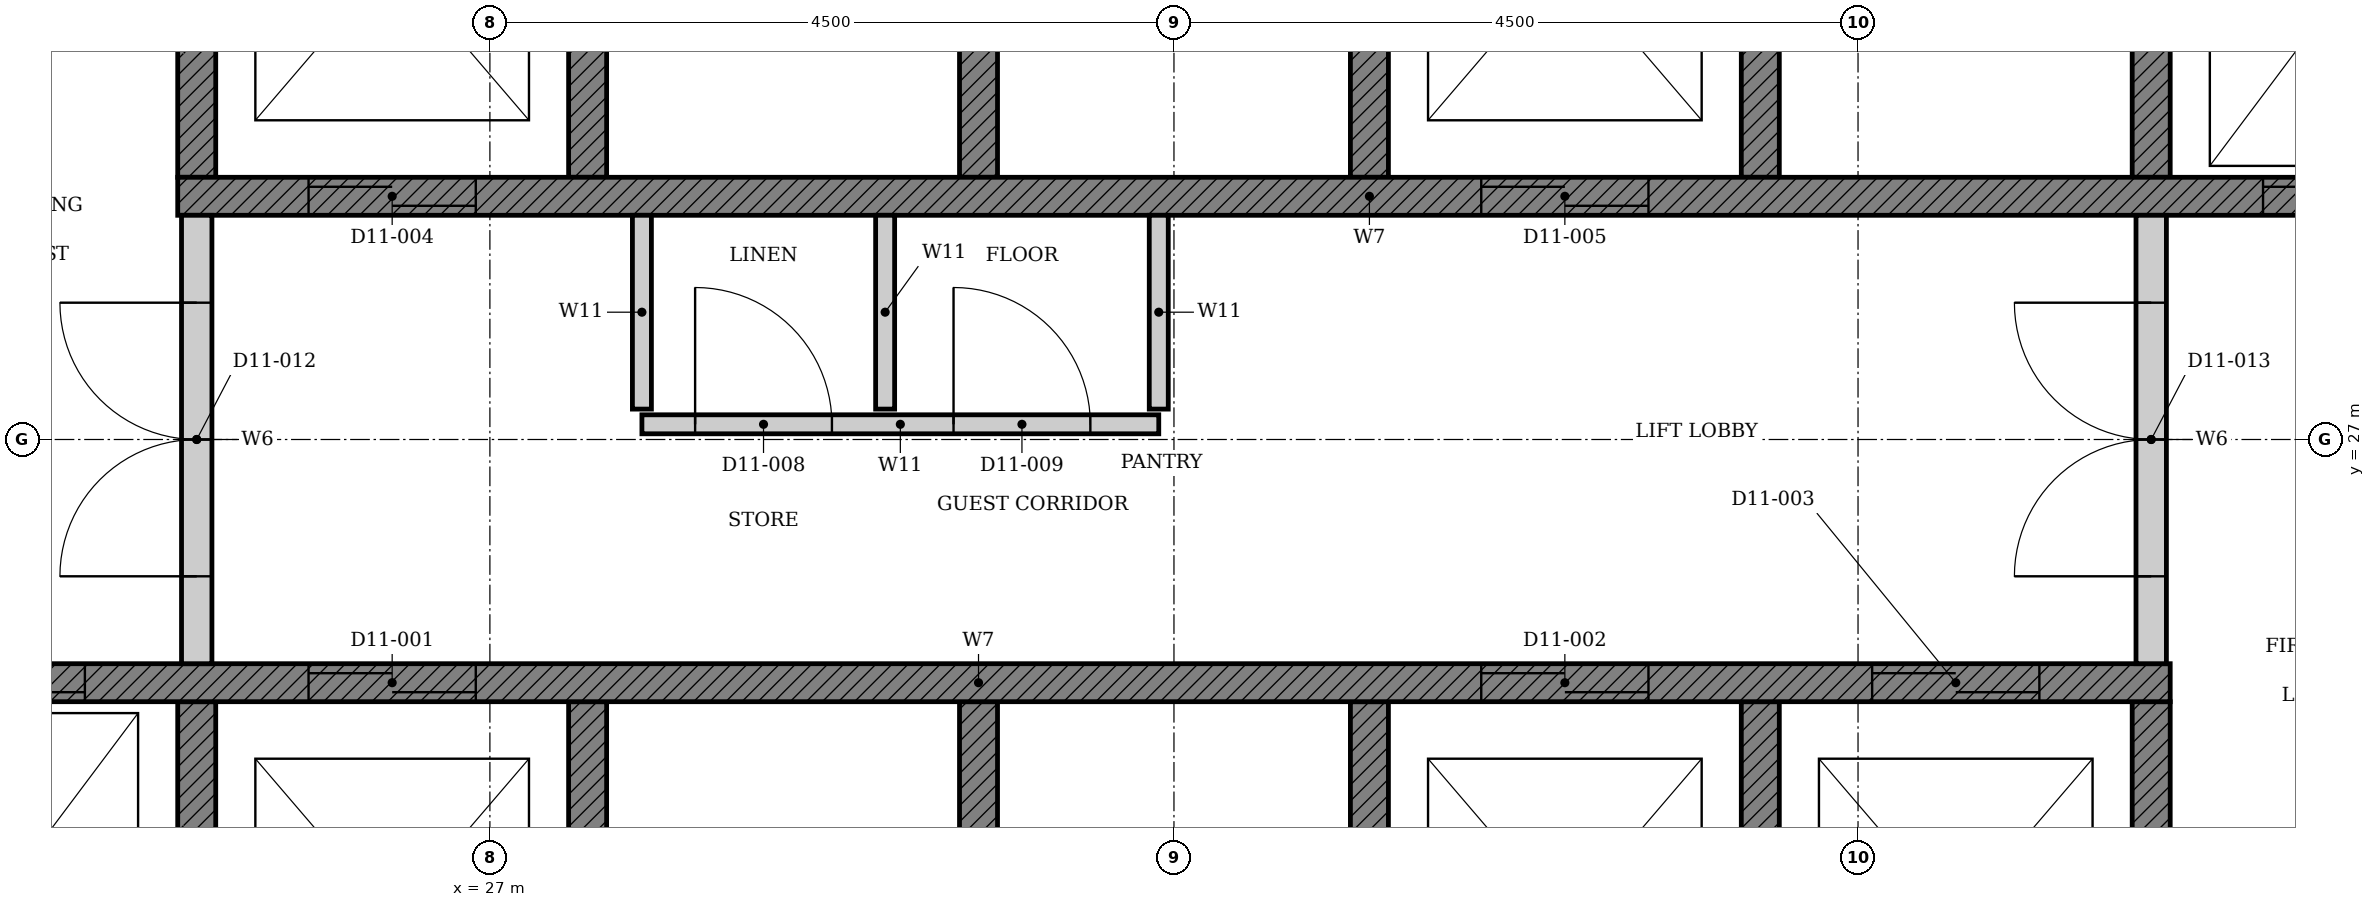
"""IFC4 building model, lengths in metres.
Left out: names, types, materials, properties, quantities, classifications, styles, units other than length and angle.
Written with IfcOpenShell. Run it as: python <this file> out.ifc"""

import sys

from ifc_helpers import new_model, si_unit, direction, frame, frame_2d, origin, place, context, subcontext, project, spatial, polyline, rectangle, outline, extrude, element, fill, save


model = new_model("IFC4")
c1 = context("Model", 3, precision=1e-05, world=origin(), true_north=direction((0.0, 1.0)))
c2 = subcontext(c1, "Body", "Model", "MODEL_VIEW")
j1 = project(units=[si_unit("LENGTHUNIT", "METRE"), si_unit("PLANEANGLEUNIT", "RADIAN")], contexts=[c1])
p1 = place(None, origin())
s1 = spatial("IfcSite", under=j1, at=p1, CompositionType="ELEMENT")
p2 = place(p1, origin())
s2 = spatial("IfcBuilding", under=s1, at=p2, CompositionType="ELEMENT")
p3 = place(p2, frame((0.0, 0.0, 52.8)))
s3 = spatial("IfcBuildingStorey", under=s2, at=p3, CompositionType="ELEMENT", Elevation=52.8)
p4 = place(p3, origin())
e1 = element("IfcWall", 1, at=p4, inside=s3, PredefinedType="SHEAR", context=c2, shape_type="SweptSolid", body=[
    extrude(outline(polyline([(22.375, 22.35), (38.053, 22.35), (38.053, 25.275), (37.803, 25.275), (37.803, 22.65), (35.482, 22.65), (35.482, 25.275), (35.232, 25.275), (35.232, 22.65), (32.911, 22.65), (32.911, 25.275), (32.661, 25.275), (32.661, 22.65), (30.339, 22.65), (30.339, 25.275), (30.089, 25.275), (30.089, 22.65), (27.768, 22.65), (27.768, 25.275), (27.518, 25.275), (27.518, 22.65), (25.197, 22.65), (25.197, 25.275), (24.947, 25.275), (24.947, 22.65), (22.625, 22.65), (22.625, 25.275), (22.375, 25.275), (22.375, 22.35)])), origin(), (0.0, 0.0, 1.0), 3.3),
])
p5 = place(p3, origin())
e2 = element("IfcWall", 2, at=p5, inside=s3, PredefinedType="SHEAR", context=c2, shape_type="SweptSolid", body=[
    extrude(outline(polyline([(24.947, 28.725), (25.197, 28.725), (25.197, 31.35), (27.518, 31.35), (27.518, 28.725), (27.768, 28.725), (27.768, 31.35), (30.089, 31.35), (30.089, 28.725), (30.339, 28.725), (30.339, 31.35), (32.661, 31.35), (32.661, 28.725), (32.911, 28.725), (32.911, 31.35), (35.232, 31.35), (35.232, 28.725), (35.482, 28.725), (35.482, 31.35), (37.803, 31.35), (37.803, 28.725), (38.053, 28.725), (38.053, 31.35), (40.375, 31.35), (40.375, 28.725), (40.625, 28.725), (40.625, 31.65), (24.947, 31.65), (24.947, 28.725)])), origin(), (0.0, 0.0, 1.0), 3.3),
])
p6 = place(p3, frame((22.375, 25.4, 0.0), z_axis=(0.0, 0.0, 1.0), x_axis=(1.0, 0.0, 0.0)))
e3 = element("IfcWall", 3, at=p6, inside=s3, PredefinedType="SHEAR", context=c2, shape_type="SweptSolid", body=[
    extrude(rectangle(XDim=15.678, YDim=0.25, at=frame_2d((7.839, 0.0))), origin(), (0.0, 0.0, 1.0), 3.3),
])
p7 = place(p6, frame((3.432, 0.0, 0.0)))
e4 = element("IfcOpeningElement", 4, at=p7, cuts=e3, PredefinedType="OPENING", context=c2, shape_type="SweptSolid", body=[
    extrude(rectangle(XDim=1.1, YDim=2.1, at=frame_2d((0.55, 1.05))), frame((0.0, 0.135, 0.0), z_axis=(0.0, -1.0, 0.0), x_axis=(1.0, 0.0, 0.0)), (0.0, 0.0, 1.0), 0.27),
])
p8 = place(p6, frame((11.146, 0.0, 0.0)))
e5 = element("IfcOpeningElement", 5, at=p8, cuts=e3, PredefinedType="OPENING", context=c2, shape_type="SweptSolid", body=[
    extrude(rectangle(XDim=1.1, YDim=2.1, at=frame_2d((0.55, 1.05))), frame((0.0, 0.135, 0.0), z_axis=(0.0, -1.0, 0.0), x_axis=(1.0, 0.0, 0.0)), (0.0, 0.0, 1.0), 0.27),
])
p9 = place(p6, frame((13.718, 0.0, 0.0)))
e6 = element("IfcOpeningElement", 6, at=p9, cuts=e3, PredefinedType="OPENING", context=c2, shape_type="SweptSolid", body=[
    extrude(rectangle(XDim=1.1, YDim=2.1, at=frame_2d((0.55, 1.05))), frame((0.0, 0.135, 0.0), z_axis=(0.0, -1.0, 0.0), x_axis=(1.0, 0.0, 0.0)), (0.0, 0.0, 1.0), 0.27),
])
p10 = place(p6, frame((0.861, 0.0, 0.0)))
e7 = element("IfcOpeningElement", 7, at=p10, cuts=e3, PredefinedType="OPENING", context=c2, shape_type="SweptSolid", body=[
    extrude(rectangle(XDim=1.1, YDim=2.1, at=frame_2d((0.55, 1.05))), frame((0.0, 0.135, 0.0), z_axis=(0.0, -1.0, 0.0), x_axis=(1.0, 0.0, 0.0)), (0.0, 0.0, 1.0), 0.27),
])
p11 = place(p3, frame((24.947, 28.6, 0.0), z_axis=(0.0, 0.0, 1.0), x_axis=(1.0, 0.0, 0.0)))
e8 = element("IfcWall", 8, at=p11, inside=s3, PredefinedType="SHEAR", context=c2, shape_type="SweptSolid", body=[
    extrude(rectangle(XDim=15.678, YDim=0.25, at=frame_2d((7.839, 0.0))), origin(), (0.0, 0.0, 1.0), 3.3),
])
p12 = place(p11, frame((0.861, 0.0, 0.0)))
e9 = element("IfcOpeningElement", 9, at=p12, cuts=e8, PredefinedType="OPENING", context=c2, shape_type="SweptSolid", body=[
    extrude(rectangle(XDim=1.1, YDim=2.1, at=frame_2d((0.55, 1.05))), frame((0.0, 0.135, 0.0), z_axis=(0.0, -1.0, 0.0), x_axis=(1.0, 0.0, 0.0)), (0.0, 0.0, 1.0), 0.27),
])
p13 = place(p11, frame((8.575, 0.0, 0.0)))
e10 = element("IfcOpeningElement", 10, at=p13, cuts=e8, PredefinedType="OPENING", context=c2, shape_type="SweptSolid", body=[
    extrude(rectangle(XDim=1.1, YDim=2.1, at=frame_2d((0.55, 1.05))), frame((0.0, 0.135, 0.0), z_axis=(0.0, -1.0, 0.0), x_axis=(1.0, 0.0, 0.0)), (0.0, 0.0, 1.0), 0.27),
])
p14 = place(p11, frame((13.718, 0.0, 0.0)))
e11 = element("IfcOpeningElement", 11, at=p14, cuts=e8, PredefinedType="OPENING", context=c2, shape_type="SweptSolid", body=[
    extrude(rectangle(XDim=1.1, YDim=2.1, at=frame_2d((0.55, 1.05))), frame((0.0, 0.135, 0.0), z_axis=(0.0, -1.0, 0.0), x_axis=(1.0, 0.0, 0.0)), (0.0, 0.0, 1.0), 0.27),
])
p15 = place(p3, frame((28.0, 27.1, 0.0), z_axis=(0.0, 0.0, 1.0), x_axis=(1.0, 0.0, 0.0)))
e12 = element("IfcWall", 12, at=p15, inside=s3, PredefinedType="PARTITIONING", context=c2, shape_type="SweptSolid", body=[
    extrude(rectangle(XDim=3.4, YDim=0.125, at=frame_2d((1.7, 0.0))), origin(), (0.0, 0.0, 1.0), 3.3),
])
p16 = place(p15, frame((0.35, 0.0, 0.0)))
e13 = element("IfcOpeningElement", 13, at=p16, cuts=e12, PredefinedType="OPENING", context=c2, shape_type="SweptSolid", body=[
    extrude(rectangle(XDim=0.9, YDim=2.1, at=frame_2d((0.45, 1.05))), frame((0.0, 0.073, 0.0), z_axis=(0.0, -1.0, 0.0), x_axis=(1.0, 0.0, 0.0)), (0.0, 0.0, 1.0), 0.145),
])
p17 = place(p15, frame((2.05, 0.0, 0.0)))
e14 = element("IfcOpeningElement", 14, at=p17, cuts=e12, PredefinedType="OPENING", context=c2, shape_type="SweptSolid", body=[
    extrude(rectangle(XDim=0.9, YDim=2.1, at=frame_2d((0.45, 1.05))), frame((0.0, 0.073, 0.0), z_axis=(0.0, -1.0, 0.0), x_axis=(1.0, 0.0, 0.0)), (0.0, 0.0, 1.0), 0.145),
])
for number, where, z_axis, x_axis in (
    (15, (28.0, 28.475, 0.0), (0.0, 0.0, 1.0), (0.0, -1.0, 0.0)),
    (16, (29.6, 28.475, 0.0), (0.0, 0.0, 1.0), (0.0, -1.0, 0.0)),
    (17, (31.4, 28.475, 0.0), (0.0, 0.0, 1.0), (0.0, -1.0, 0.0)),
):
    element("IfcWall", number, at=place(p3, frame(where, z_axis=z_axis, x_axis=x_axis)), inside=s3, PredefinedType="PARTITIONING", context=c2, shape_type="SweptSolid", body=[
        extrude(rectangle(XDim=1.275, YDim=0.125, at=frame_2d((0.638, 0.0))), origin(), (0.0, 0.0, 1.0), 3.3),
    ])
p18 = place(p3, frame((25.072, 25.525, 0.0), z_axis=(0.0, 0.0, 1.0), x_axis=(0.0, 1.0, 0.0)))
e18 = element("IfcWall", 18, at=p18, inside=s3, PredefinedType="PARTITIONING", context=c2, shape_type="SweptSolid", body=[
    extrude(rectangle(XDim=2.95, YDim=0.2, at=frame_2d((1.475, 0.0))), origin(), (0.0, 0.0, 1.0), 3.3),
])
p19 = place(p18, frame((0.575, 0.0, 0.0)))
e19 = element("IfcOpeningElement", 19, at=p19, cuts=e18, PredefinedType="OPENING", context=c2, shape_type="SweptSolid", body=[
    extrude(rectangle(XDim=1.8, YDim=2.1, at=frame_2d((0.9, 1.05))), frame((0.0, 0.11, 0.0), z_axis=(0.0, -1.0, 0.0), x_axis=(1.0, 0.0, 0.0)), (0.0, 0.0, 1.0), 0.22),
])
p20 = place(p3, frame((37.928, 25.525, 0.0), z_axis=(0.0, 0.0, 1.0), x_axis=(0.0, 1.0, 0.0)))
e20 = element("IfcWall", 20, at=p20, inside=s3, PredefinedType="PARTITIONING", context=c2, shape_type="SweptSolid", body=[
    extrude(rectangle(XDim=2.95, YDim=0.2, at=frame_2d((1.475, 0.0))), origin(), (0.0, 0.0, 1.0), 3.3),
])
p21 = place(p20, frame((0.575, 0.0, 0.0)))
e21 = element("IfcOpeningElement", 21, at=p21, cuts=e20, PredefinedType="OPENING", context=c2, shape_type="SweptSolid", body=[
    extrude(rectangle(XDim=1.8, YDim=2.1, at=frame_2d((0.9, 1.05))), frame((0.0, 0.11, 0.0), z_axis=(0.0, -1.0, 0.0), x_axis=(1.0, 0.0, 0.0)), (0.0, 0.0, 1.0), 0.22),
])
p22 = place(p7, origin())
e22 = element("IfcDoor", 22, at=p22, inside=s3, OperationType="DOUBLE_DOOR_SLIDING", PredefinedType="DOOR", context=c2, shape_type="SweptSolid", body=[
    extrude(rectangle(XDim=1.1, YDim=2.1, at=frame_2d((0.55, 1.05))), frame((0.0, 0.025, 0.0), z_axis=(0.0, -1.0, 0.0), x_axis=(1.0, 0.0, 0.0)), (0.0, 0.0, 1.0), 0.05),
])
fill(e4, e22)
p23 = place(p8, origin())
e23 = element("IfcDoor", 23, at=p23, inside=s3, OperationType="DOUBLE_DOOR_SLIDING", PredefinedType="DOOR", context=c2, shape_type="SweptSolid", body=[
    extrude(rectangle(XDim=1.1, YDim=2.1, at=frame_2d((0.55, 1.05))), frame((0.0, 0.025, 0.0), z_axis=(0.0, -1.0, 0.0), x_axis=(1.0, 0.0, 0.0)), (0.0, 0.0, 1.0), 0.05),
])
fill(e5, e23)
p24 = place(p9, origin())
e24 = element("IfcDoor", 24, at=p24, inside=s3, OperationType="DOUBLE_DOOR_SLIDING", PredefinedType="DOOR", context=c2, shape_type="SweptSolid", body=[
    extrude(rectangle(XDim=1.1, YDim=2.1, at=frame_2d((0.55, 1.05))), frame((0.0, 0.025, 0.0), z_axis=(0.0, -1.0, 0.0), x_axis=(1.0, 0.0, 0.0)), (0.0, 0.0, 1.0), 0.05),
])
fill(e6, e24)
p25 = place(p12, origin())
e25 = element("IfcDoor", 25, at=p25, inside=s3, OperationType="DOUBLE_DOOR_SLIDING", PredefinedType="DOOR", context=c2, shape_type="SweptSolid", body=[
    extrude(rectangle(XDim=1.1, YDim=2.1, at=frame_2d((0.55, 1.05))), frame((0.0, 0.025, 0.0), z_axis=(0.0, -1.0, 0.0), x_axis=(1.0, 0.0, 0.0)), (0.0, 0.0, 1.0), 0.05),
])
fill(e9, e25)
p26 = place(p13, origin())
e26 = element("IfcDoor", 26, at=p26, inside=s3, OperationType="DOUBLE_DOOR_SLIDING", PredefinedType="DOOR", context=c2, shape_type="SweptSolid", body=[
    extrude(rectangle(XDim=1.1, YDim=2.1, at=frame_2d((0.55, 1.05))), frame((0.0, 0.025, 0.0), z_axis=(0.0, -1.0, 0.0), x_axis=(1.0, 0.0, 0.0)), (0.0, 0.0, 1.0), 0.05),
])
fill(e10, e26)
p27 = place(p10, origin())
e27 = element("IfcDoor", 27, at=p27, inside=s3, OperationType="DOUBLE_DOOR_SLIDING", PredefinedType="DOOR", context=c2, shape_type="SweptSolid", body=[
    extrude(rectangle(XDim=1.1, YDim=2.1, at=frame_2d((0.55, 1.05))), frame((0.0, 0.025, 0.0), z_axis=(0.0, -1.0, 0.0), x_axis=(1.0, 0.0, 0.0)), (0.0, 0.0, 1.0), 0.05),
])
fill(e7, e27)
p28 = place(p14, origin())
e28 = element("IfcDoor", 28, at=p28, inside=s3, OperationType="DOUBLE_DOOR_SLIDING", PredefinedType="DOOR", context=c2, shape_type="SweptSolid", body=[
    extrude(rectangle(XDim=1.1, YDim=2.1, at=frame_2d((0.55, 1.05))), frame((0.0, 0.025, 0.0), z_axis=(0.0, -1.0, 0.0), x_axis=(1.0, 0.0, 0.0)), (0.0, 0.0, 1.0), 0.05),
])
fill(e11, e28)
p29 = place(p16, origin())
e29 = element("IfcDoor", 29, at=p29, inside=s3, OperationType="SINGLE_SWING_LEFT", PredefinedType="DOOR", context=c2, shape_type="SweptSolid", body=[
    extrude(rectangle(XDim=0.9, YDim=2.1, at=frame_2d((0.45, 1.05))), frame((0.0, 0.025, 0.0), z_axis=(0.0, -1.0, 0.0), x_axis=(1.0, 0.0, 0.0)), (0.0, 0.0, 1.0), 0.05),
])
fill(e13, e29)
p30 = place(p17, origin())
e30 = element("IfcDoor", 30, at=p30, inside=s3, OperationType="SINGLE_SWING_LEFT", PredefinedType="DOOR", context=c2, shape_type="SweptSolid", body=[
    extrude(rectangle(XDim=0.9, YDim=2.1, at=frame_2d((0.45, 1.05))), frame((0.0, 0.025, 0.0), z_axis=(0.0, -1.0, 0.0), x_axis=(1.0, 0.0, 0.0)), (0.0, 0.0, 1.0), 0.05),
])
fill(e14, e30)
p31 = place(p19, origin())
e31 = element("IfcDoor", 31, at=p31, inside=s3, OperationType="DOUBLE_DOOR_SINGLE_SWING", PredefinedType="DOOR", context=c2, shape_type="SweptSolid", body=[
    extrude(rectangle(XDim=1.8, YDim=2.1, at=frame_2d((0.9, 1.05))), frame((0.0, 0.025, 0.0), z_axis=(0.0, -1.0, 0.0), x_axis=(1.0, 0.0, 0.0)), (0.0, 0.0, 1.0), 0.05),
])
fill(e19, e31)
p32 = place(p21, origin())
e32 = element("IfcDoor", 32, at=p32, inside=s3, OperationType="DOUBLE_DOOR_SINGLE_SWING", PredefinedType="DOOR", context=c2, shape_type="SweptSolid", body=[
    extrude(rectangle(XDim=1.8, YDim=2.1, at=frame_2d((0.9, 1.05))), frame((0.0, 0.025, 0.0), z_axis=(0.0, -1.0, 0.0), x_axis=(1.0, 0.0, 0.0)), (0.0, 0.0, 1.0), 0.05),
])
fill(e21, e32)
save(model, sys.argv[1])
